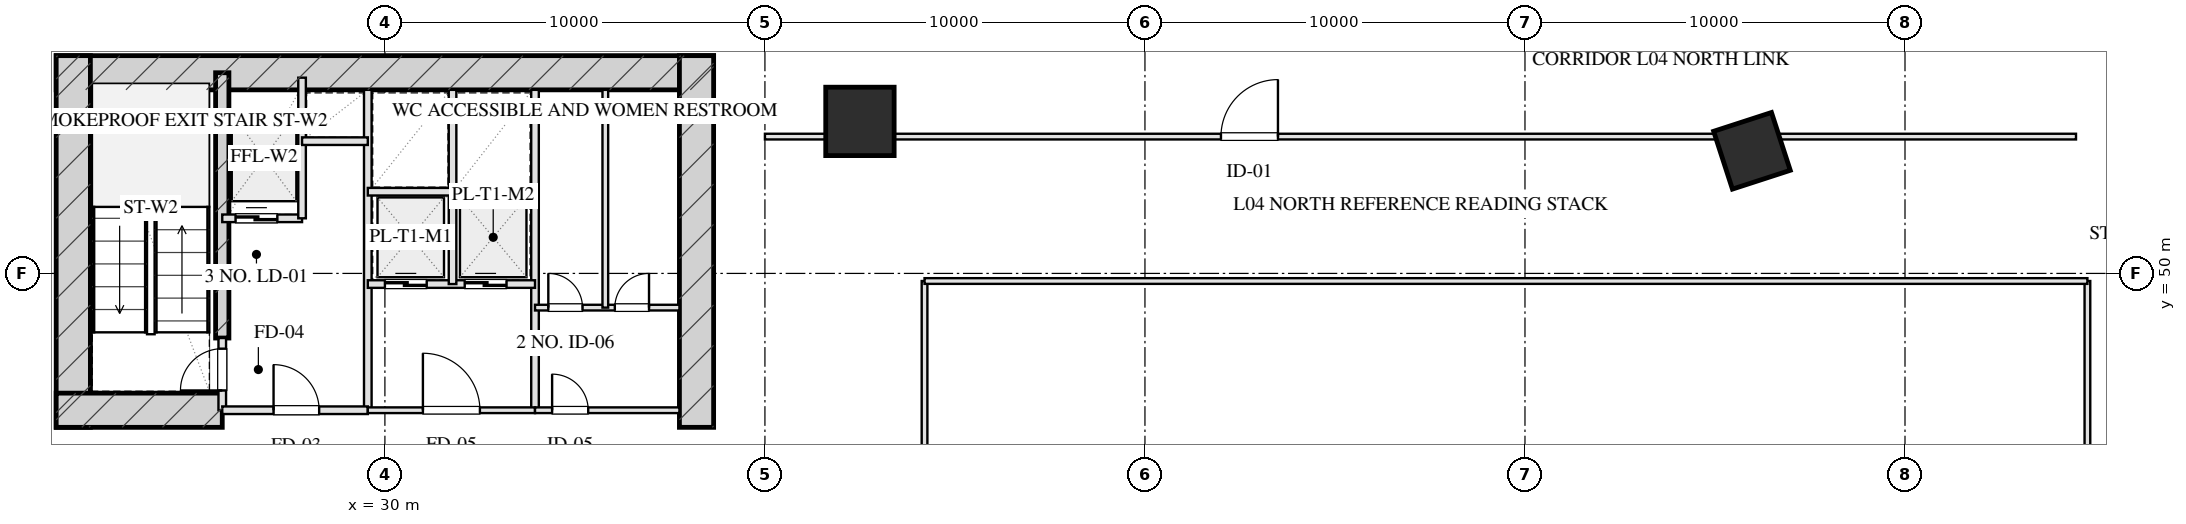
"""IFC4 building model, lengths in metres.
Left out: names, types, materials, properties, quantities, classifications, styles, units other than length and angle.
Written with IfcOpenShell. Run it as: python <this file> out.ifc"""

import sys

from ifc_helpers import new_model, si_unit, direction, frame, frame_2d, origin, origin_2d, place, context, subcontext, project, spatial, rectangle, hollow_rectangle, extrude, element, fill, save


model = new_model("IFC4")
c1 = context("Model", 3, precision=1e-05, world=origin(), true_north=direction((0.0, 1.0)))
c2 = subcontext(c1, "Body", "Model", "MODEL_VIEW")
j1 = project(units=[si_unit("LENGTHUNIT", "METRE"), si_unit("PLANEANGLEUNIT", "RADIAN")], contexts=[c1])
p1 = place(None, origin())
s1 = spatial("IfcSite", under=j1, at=p1, CompositionType="ELEMENT")
p2 = place(p1, origin())
s2 = spatial("IfcBuilding", under=s1, at=p2, CompositionType="ELEMENT")
p3 = place(p2, frame((0.0, 0.0, 22.0)))
s3 = spatial("IfcBuildingStorey", under=s2, at=p3, CompositionType="ELEMENT", Elevation=22.0)
p4 = place(p3, frame((21.35, 55.28, 0.0), z_axis=(0.0, 0.0, 1.0), x_axis=(1.0, 0.0, 0.0)))
e1 = element("IfcWall", 1, at=p4, inside=s3, PredefinedType="SHEAR", context=c2, shape_type="SweptSolid", body=[
    extrude(rectangle(XDim=17.3, YDim=0.9, at=frame_2d((8.65, 0.0))), origin(), (0.0, 0.0, 1.0), 4.0),
])
for number, where, z_axis, x_axis in (
    (2, (21.8, 45.95, 0.0), (0.0, 0.0, 1.0), (0.0, 1.0, 0.0)),
    (3, (38.2, 45.95, 0.0), (0.0, 0.0, 1.0), (0.0, 1.0, 0.0)),
):
    element("IfcWall", number, at=place(p3, frame(where, z_axis=z_axis, x_axis=x_axis)), inside=s3, PredefinedType="SHEAR", context=c2, shape_type="SweptSolid", body=[
        extrude(rectangle(XDim=9.78, YDim=0.9, at=frame_2d((4.89, 0.0))), origin(), (0.0, 0.0, 1.0), 4.0),
    ])
p5 = place(p3, frame((25.72, 48.3, 0.0), z_axis=(0.0, 0.0, 1.0), x_axis=(0.0, 1.0, 0.0)))
e4 = element("IfcWall", 4, at=p5, inside=s3, PredefinedType="SHEAR", context=c2, shape_type="SweptSolid", body=[
    extrude(rectangle(XDim=6.98, YDim=0.35, at=frame_2d((3.49, 0.0))), origin(), (0.0, 0.0, 1.0), 4.0),
])
p6 = place(p3, frame((21.35, 46.4, 0.0), z_axis=(0.0, 0.0, 1.0), x_axis=(1.0, 0.0, 0.0)))
e5 = element("IfcWall", 5, at=p6, inside=s3, PredefinedType="SHEAR", context=c2, shape_type="SweptSolid", body=[
    extrude(rectangle(XDim=4.37, YDim=0.9, at=frame_2d((2.185, 0.0))), origin(), (0.0, 0.0, 1.0), 4.0),
])
p7 = place(p3, frame((42.5, 54.0, 0.0), z_axis=(0.0, 0.0, 1.0), x_axis=(1.0, 0.0, 0.0)))
e6 = element("IfcColumn", 6, at=p7, inside=s3, PredefinedType="COLUMN", context=c2, shape_type="SweptSolid", body=[
    extrude(hollow_rectangle(XDim=1.8, YDim=1.8, WallThickness=0.06, at=origin_2d()), origin(), (0.0, 0.0, 1.0), 4.001),
])
p8 = place(p3, frame((65.973, 53.226, 0.0), z_axis=(0.0, 0.0, 1.0), x_axis=(0.951056516295, 0.309016994375, 0.0)))
e7 = element("IfcColumn", 7, at=p8, inside=s3, PredefinedType="COLUMN", context=c2, shape_type="SweptSolid", body=[
    extrude(hollow_rectangle(XDim=1.6, YDim=1.6, WallThickness=0.055, at=origin_2d()), origin(), (0.0, 0.0, 1.0), 4.001),
])
p9 = place(p3, frame((25.72, 46.4, 0.0), z_axis=(0.0, 0.0, 1.0), x_axis=(0.0, 1.0, 0.0)))
e8 = element("IfcWall", 8, at=p9, inside=s3, PredefinedType="PARTITIONING", context=c2, shape_type="SweptSolid", body=[
    extrude(rectangle(XDim=1.9, YDim=0.2, at=frame_2d((0.95, 0.0))), origin(), (0.0, 0.0, 1.0), 3.725),
])
p10 = place(p9, frame((0.52, 0.0, 0.0)))
e9 = element("IfcOpeningElement", 9, at=p10, cuts=e8, PredefinedType="OPENING", context=c2, shape_type="SweptSolid", body=[
    extrude(rectangle(XDim=1.1, YDim=2.05, at=frame_2d((0.55, 1.025))), frame((0.0, 0.11, 0.0), z_axis=(0.0, -1.0, 0.0), x_axis=(1.0, 0.0, 0.0)), (0.0, 0.0, 1.0), 0.22),
])
p11 = place(p3, frame((29.55, 46.4, 0.0), z_axis=(0.0, 0.0, 1.0), x_axis=(0.0, 1.0, 0.0)))
e10 = element("IfcWall", 10, at=p11, inside=s3, PredefinedType="PARTITIONING", context=c2, shape_type="SweptSolid", body=[
    extrude(rectangle(XDim=8.43, YDim=0.2, at=frame_2d((4.215, 0.0))), origin(), (0.0, 0.0, 1.0), 3.725),
])
p12 = place(p3, frame((25.72, 46.4, 0.0), z_axis=(0.0, 0.0, 1.0), x_axis=(1.0, 0.0, 0.0)))
e11 = element("IfcWall", 11, at=p12, inside=s3, PredefinedType="PARTITIONING", context=c2, shape_type="SweptSolid", body=[
    extrude(rectangle(XDim=3.83, YDim=0.2, at=frame_2d((1.915, 0.0))), origin(), (0.0, 0.0, 1.0), 3.725),
])
p13 = place(p12, frame((1.35, 0.0, 0.0)))
e12 = element("IfcOpeningElement", 12, at=p13, cuts=e11, PredefinedType="OPENING", context=c2, shape_type="SweptSolid", body=[
    extrude(rectangle(XDim=1.2, YDim=2.05, at=frame_2d((0.6, 1.025))), frame((0.0, 0.11, 0.0), z_axis=(0.0, -1.0, 0.0), x_axis=(1.0, 0.0, 0.0)), (0.0, 0.0, 1.0), 0.22),
])
p14 = place(p3, frame((25.72, 51.45, 0.0), z_axis=(0.0, 0.0, 1.0), x_axis=(1.0, 0.0, 0.0)))
e13 = element("IfcWall", 13, at=p14, inside=s3, PredefinedType="PARTITIONING", context=c2, shape_type="SweptSolid", body=[
    extrude(rectangle(XDim=2.1, YDim=0.2, at=frame_2d((1.05, 0.0))), origin(), (0.0, 0.0, 1.0), 3.725),
])
p15 = place(p14, frame((0.35, 0.0, 0.0)))
e14 = element("IfcOpeningElement", 14, at=p15, cuts=e13, PredefinedType="OPENING", context=c2, shape_type="SweptSolid", body=[
    extrude(rectangle(XDim=1.1, YDim=2.05, at=frame_2d((0.55, 1.025))), frame((0.0, 0.11, 0.0), z_axis=(0.0, -1.0, 0.0), x_axis=(1.0, 0.0, 0.0)), (0.0, 0.0, 1.0), 0.22),
])
p16 = place(p3, frame((27.82, 51.45, 0.0), z_axis=(0.0, 0.0, 1.0), x_axis=(0.0, 1.0, 0.0)))
e15 = element("IfcWall", 15, at=p16, inside=s3, PredefinedType="PARTITIONING", context=c2, shape_type="SweptSolid", body=[
    extrude(rectangle(XDim=3.7, YDim=0.2, at=frame_2d((1.85, 0.0))), origin(), (0.0, 0.0, 1.0), 3.725),
])
p17 = place(p3, frame((27.82, 53.48, 0.0), z_axis=(0.0, 0.0, 1.0), x_axis=(1.0, 0.0, 0.0)))
e16 = element("IfcWall", 16, at=p17, inside=s3, PredefinedType="PARTITIONING", context=c2, shape_type="SweptSolid", body=[
    extrude(rectangle(XDim=1.73, YDim=0.2, at=frame_2d((0.865, 0.0))), origin(), (0.0, 0.0, 1.0), 3.725),
])
p18 = place(p3, frame((33.95, 46.4, 0.0), z_axis=(0.0, 0.0, 1.0), x_axis=(0.0, 1.0, 0.0)))
e17 = element("IfcWall", 17, at=p18, inside=s3, PredefinedType="PARTITIONING", context=c2, shape_type="SweptSolid", body=[
    extrude(rectangle(XDim=8.43, YDim=0.2, at=frame_2d((4.215, 0.0))), origin(), (0.0, 0.0, 1.0), 3.725),
])
p19 = place(p3, frame((29.55, 46.4, 0.0), z_axis=(0.0, 0.0, 1.0), x_axis=(1.0, 0.0, 0.0)))
e18 = element("IfcWall", 18, at=p19, inside=s3, PredefinedType="PARTITIONING", context=c2, shape_type="SweptSolid", body=[
    extrude(rectangle(XDim=4.4, YDim=0.15, at=frame_2d((2.2, 0.0))), origin(), (0.0, 0.0, 1.0), 3.725),
])
p20 = place(p19, frame((1.45, 0.0, 0.0)))
e19 = element("IfcOpeningElement", 19, at=p20, cuts=e18, PredefinedType="OPENING", context=c2, shape_type="SweptSolid", body=[
    extrude(rectangle(XDim=1.5, YDim=2.05, at=frame_2d((0.75, 1.025))), frame((0.0, 0.085, 0.0), z_axis=(0.0, -1.0, 0.0), x_axis=(1.0, 0.0, 0.0)), (0.0, 0.0, 1.0), 0.17),
])
p21 = place(p3, frame((29.55, 49.72, 0.0), z_axis=(0.0, 0.0, 1.0), x_axis=(1.0, 0.0, 0.0)))
e20 = element("IfcWall", 20, at=p21, inside=s3, PredefinedType="PARTITIONING", context=c2, shape_type="SweptSolid", body=[
    extrude(rectangle(XDim=4.4, YDim=0.2, at=frame_2d((2.2, 0.0))), origin(), (0.0, 0.0, 1.0), 3.725),
])
p22 = place(p21, frame((0.45, 0.0, 0.0)))
e21 = element("IfcOpeningElement", 21, at=p22, cuts=e20, PredefinedType="OPENING", context=c2, shape_type="SweptSolid", body=[
    extrude(rectangle(XDim=1.1, YDim=2.05, at=frame_2d((0.55, 1.025))), frame((0.0, 0.11, 0.0), z_axis=(0.0, -1.0, 0.0), x_axis=(1.0, 0.0, 0.0)), (0.0, 0.0, 1.0), 0.22),
])
p23 = place(p21, frame((2.55, 0.0, 0.0)))
e22 = element("IfcOpeningElement", 22, at=p23, cuts=e20, PredefinedType="OPENING", context=c2, shape_type="SweptSolid", body=[
    extrude(rectangle(XDim=1.1, YDim=2.05, at=frame_2d((0.55, 1.025))), frame((0.0, 0.11, 0.0), z_axis=(0.0, -1.0, 0.0), x_axis=(1.0, 0.0, 0.0)), (0.0, 0.0, 1.0), 0.22),
])
p24 = place(p3, frame((31.78, 49.72, 0.0), z_axis=(0.0, 0.0, 1.0), x_axis=(0.0, 1.0, 0.0)))
e23 = element("IfcWall", 23, at=p24, inside=s3, PredefinedType="PARTITIONING", context=c2, shape_type="SweptSolid", body=[
    extrude(rectangle(XDim=5.11, YDim=0.2, at=frame_2d((2.555, 0.0))), origin(), (0.0, 0.0, 1.0), 3.725),
])
p25 = place(p3, frame((29.55, 52.15, 0.0), z_axis=(0.0, 0.0, 1.0), x_axis=(1.0, 0.0, 0.0)))
e24 = element("IfcWall", 24, at=p25, inside=s3, PredefinedType="PARTITIONING", context=c2, shape_type="SweptSolid", body=[
    extrude(rectangle(XDim=4.4, YDim=0.2, at=frame_2d((2.2, 0.0))), origin(), (0.0, 0.0, 1.0), 3.725),
])
p26 = place(p3, frame((33.95, 46.4, 0.0), z_axis=(0.0, 0.0, 1.0), x_axis=(1.0, 0.0, 0.0)))
e25 = element("IfcWall", 25, at=p26, inside=s3, PredefinedType="PARTITIONING", context=c2, shape_type="SweptSolid", body=[
    extrude(rectangle(XDim=3.8, YDim=0.15, at=frame_2d((1.9, 0.0))), origin(), (0.0, 0.0, 1.0), 3.725),
])
p27 = place(p26, frame((0.45, 0.0, 0.0)))
e26 = element("IfcOpeningElement", 26, at=p27, cuts=e25, PredefinedType="OPENING", context=c2, shape_type="SweptSolid", body=[
    extrude(rectangle(XDim=0.95, YDim=2.05, at=frame_2d((0.475, 1.025))), frame((0.0, 0.085, 0.0), z_axis=(0.0, -1.0, 0.0), x_axis=(1.0, 0.0, 0.0)), (0.0, 0.0, 1.0), 0.17),
])
p28 = place(p3, frame((33.95, 49.1, 0.0), z_axis=(0.0, 0.0, 1.0), x_axis=(1.0, 0.0, 0.0)))
e27 = element("IfcWall", 27, at=p28, inside=s3, PredefinedType="PARTITIONING", context=c2, shape_type="SweptSolid", body=[
    extrude(rectangle(XDim=3.8, YDim=0.15, at=frame_2d((1.9, 0.0))), origin(), (0.0, 0.0, 1.0), 3.725),
])
p29 = place(p28, frame((0.35, 0.0, 0.0)))
e28 = element("IfcOpeningElement", 28, at=p29, cuts=e27, PredefinedType="OPENING", context=c2, shape_type="SweptSolid", body=[
    extrude(rectangle(XDim=0.9, YDim=2.05, at=frame_2d((0.45, 1.025))), frame((0.0, 0.085, 0.0), z_axis=(0.0, -1.0, 0.0), x_axis=(1.0, 0.0, 0.0)), (0.0, 0.0, 1.0), 0.17),
])
p30 = place(p28, frame((2.1, 0.0, 0.0)))
e29 = element("IfcOpeningElement", 29, at=p30, cuts=e27, PredefinedType="OPENING", context=c2, shape_type="SweptSolid", body=[
    extrude(rectangle(XDim=0.9, YDim=2.05, at=frame_2d((0.45, 1.025))), frame((0.0, 0.085, 0.0), z_axis=(0.0, -1.0, 0.0), x_axis=(1.0, 0.0, 0.0)), (0.0, 0.0, 1.0), 0.17),
])
p31 = place(p3, frame((35.8, 49.1, 0.0), z_axis=(0.0, 0.0, 1.0), x_axis=(0.0, 1.0, 0.0)))
e30 = element("IfcWall", 30, at=p31, inside=s3, PredefinedType="PARTITIONING", context=c2, shape_type="SweptSolid", body=[
    extrude(rectangle(XDim=5.73, YDim=0.15, at=frame_2d((2.865, 0.0))), origin(), (0.0, 0.0, 1.0), 3.725),
])
p32 = place(p3, frame((44.2, 18.2, 0.0), z_axis=(0.0, 0.0, 1.0), x_axis=(0.0, 1.0, 0.0)))
e31 = element("IfcWall", 31, at=p32, inside=s3, PredefinedType="PARTITIONING", context=c2, shape_type="SweptSolid", body=[
    extrude(rectangle(XDim=31.6, YDim=0.15, at=frame_2d((15.8, 0.0))), origin(), (0.0, 0.0, 1.0), 3.725),
])
p33 = place(p32, frame((14.0, 0.0, 0.0)))
e32 = element("IfcOpeningElement", 32, at=p33, cuts=e31, PredefinedType="OPENING", context=c2, shape_type="SweptSolid", body=[
    extrude(rectangle(XDim=1.5, YDim=2.05, at=frame_2d((0.75, 1.025))), frame((0.0, 0.085, 0.0), z_axis=(0.0, -1.0, 0.0), x_axis=(1.0, 0.0, 0.0)), (0.0, 0.0, 1.0), 0.17),
])
p34 = place(p3, frame((74.8, 18.2, 0.0), z_axis=(0.0, 0.0, 1.0), x_axis=(0.0, 1.0, 0.0)))
e33 = element("IfcWall", 33, at=p34, inside=s3, PredefinedType="PARTITIONING", context=c2, shape_type="SweptSolid", body=[
    extrude(rectangle(XDim=31.6, YDim=0.15, at=frame_2d((15.8, 0.0))), origin(), (0.0, 0.0, 1.0), 2.315),
])
p35 = place(p34, frame((14.0, 0.0, 0.0)))
e34 = element("IfcOpeningElement", 34, at=p35, cuts=e33, PredefinedType="OPENING", context=c2, shape_type="SweptSolid", body=[
    extrude(rectangle(XDim=1.5, YDim=2.05, at=frame_2d((0.75, 1.025))), frame((0.0, 0.085, 0.0), z_axis=(0.0, -1.0, 0.0), x_axis=(1.0, 0.0, 0.0)), (0.0, 0.0, 1.0), 0.17),
])
p36 = place(p3, frame((44.2, 49.8, 0.0), z_axis=(0.0, 0.0, 1.0), x_axis=(1.0, 0.0, 0.0)))
e35 = element("IfcWall", 35, at=p36, inside=s3, PredefinedType="PARTITIONING", context=c2, shape_type="SweptSolid", body=[
    extrude(rectangle(XDim=30.6, YDim=0.15, at=frame_2d((15.3, 0.0))), origin(), (0.0, 0.0, 1.0), 3.265),
])
p37 = place(p3, frame((40.0, 53.6, 0.0), z_axis=(0.0, 0.0, 1.0), x_axis=(1.0, 0.0, 0.0)))
e36 = element("IfcWall", 36, at=p37, inside=s3, PredefinedType="PARTITIONING", context=c2, shape_type="SweptSolid", body=[
    extrude(rectangle(XDim=34.5, YDim=0.15, at=frame_2d((17.25, 0.0))), origin(), (0.0, 0.0, 1.0), 2.315),
])
p38 = place(p37, frame((12.0, 0.0, 0.0)))
e37 = element("IfcOpeningElement", 37, at=p38, cuts=e36, PredefinedType="OPENING", context=c2, shape_type="SweptSolid", body=[
    extrude(rectangle(XDim=1.5, YDim=2.05, at=frame_2d((0.75, 1.025))), frame((0.0, 0.085, 0.0), z_axis=(0.0, -1.0, 0.0), x_axis=(1.0, 0.0, 0.0)), (0.0, 0.0, 1.0), 0.17),
])
p39 = place(p10, origin())
e38 = element("IfcDoor", 38, at=p39, inside=s3, OperationType="SINGLE_SWING_LEFT", PredefinedType="DOOR", context=c2, shape_type="SweptSolid", body=[
    extrude(rectangle(XDim=1.1, YDim=2.05, at=frame_2d((0.55, 1.025))), frame((0.0, 0.025, 0.0), z_axis=(0.0, -1.0, 0.0), x_axis=(1.0, 0.0, 0.0)), (0.0, 0.0, 1.0), 0.05),
])
fill(e9, e38)
p40 = place(p13, origin())
e39 = element("IfcDoor", 39, at=p40, inside=s3, OperationType="SINGLE_SWING_LEFT", PredefinedType="DOOR", context=c2, shape_type="SweptSolid", body=[
    extrude(rectangle(XDim=1.2, YDim=2.05, at=frame_2d((0.6, 1.025))), frame((0.0, 0.025, 0.0), z_axis=(0.0, -1.0, 0.0), x_axis=(1.0, 0.0, 0.0)), (0.0, 0.0, 1.0), 0.05),
])
fill(e12, e39)
p41 = place(p15, origin())
e40 = element("IfcDoor", 40, at=p41, inside=s3, OperationType="DOUBLE_DOOR_SLIDING", PredefinedType="DOOR", context=c2, shape_type="SweptSolid", body=[
    extrude(rectangle(XDim=1.1, YDim=2.05, at=frame_2d((0.55, 1.025))), frame((0.0, 0.025, 0.0), z_axis=(0.0, -1.0, 0.0), x_axis=(1.0, 0.0, 0.0)), (0.0, 0.0, 1.0), 0.05),
])
fill(e14, e40)
p42 = place(p20, origin())
e41 = element("IfcDoor", 41, at=p42, inside=s3, OperationType="SINGLE_SWING_LEFT", PredefinedType="DOOR", context=c2, shape_type="SweptSolid", body=[
    extrude(rectangle(XDim=1.5, YDim=2.05, at=frame_2d((0.75, 1.025))), frame((0.0, 0.025, 0.0), z_axis=(0.0, -1.0, 0.0), x_axis=(1.0, 0.0, 0.0)), (0.0, 0.0, 1.0), 0.05),
])
fill(e19, e41)
p43 = place(p22, origin())
e42 = element("IfcDoor", 42, at=p43, inside=s3, OperationType="DOUBLE_DOOR_SLIDING", PredefinedType="DOOR", context=c2, shape_type="SweptSolid", body=[
    extrude(rectangle(XDim=1.1, YDim=2.05, at=frame_2d((0.55, 1.025))), frame((0.0, 0.025, 0.0), z_axis=(0.0, -1.0, 0.0), x_axis=(1.0, 0.0, 0.0)), (0.0, 0.0, 1.0), 0.05),
])
fill(e21, e42)
p44 = place(p23, origin())
e43 = element("IfcDoor", 43, at=p44, inside=s3, OperationType="DOUBLE_DOOR_SLIDING", PredefinedType="DOOR", context=c2, shape_type="SweptSolid", body=[
    extrude(rectangle(XDim=1.1, YDim=2.05, at=frame_2d((0.55, 1.025))), frame((0.0, 0.025, 0.0), z_axis=(0.0, -1.0, 0.0), x_axis=(1.0, 0.0, 0.0)), (0.0, 0.0, 1.0), 0.05),
])
fill(e22, e43)
p45 = place(p27, origin())
e44 = element("IfcDoor", 44, at=p45, inside=s3, OperationType="SINGLE_SWING_LEFT", PredefinedType="DOOR", context=c2, shape_type="SweptSolid", body=[
    extrude(rectangle(XDim=0.95, YDim=2.05, at=frame_2d((0.475, 1.025))), frame((0.0, 0.025, 0.0), z_axis=(0.0, -1.0, 0.0), x_axis=(1.0, 0.0, 0.0)), (0.0, 0.0, 1.0), 0.05),
])
fill(e26, e44)
p46 = place(p29, origin())
e45 = element("IfcDoor", 45, at=p46, inside=s3, OperationType="SINGLE_SWING_LEFT", PredefinedType="DOOR", context=c2, shape_type="SweptSolid", body=[
    extrude(rectangle(XDim=0.9, YDim=2.05, at=frame_2d((0.45, 1.025))), frame((0.0, 0.025, 0.0), z_axis=(0.0, -1.0, 0.0), x_axis=(1.0, 0.0, 0.0)), (0.0, 0.0, 1.0), 0.05),
])
fill(e28, e45)
p47 = place(p30, origin())
e46 = element("IfcDoor", 46, at=p47, inside=s3, OperationType="SINGLE_SWING_RIGHT", PredefinedType="DOOR", context=c2, shape_type="SweptSolid", body=[
    extrude(rectangle(XDim=0.9, YDim=2.05, at=frame_2d((0.45, 1.025))), frame((0.0, 0.025, 0.0), z_axis=(0.0, -1.0, 0.0), x_axis=(1.0, 0.0, 0.0)), (0.0, 0.0, 1.0), 0.05),
])
fill(e29, e46)
p48 = place(p38, origin())
e47 = element("IfcDoor", 47, at=p48, inside=s3, OperationType="SINGLE_SWING_RIGHT", PredefinedType="DOOR", context=c2, shape_type="SweptSolid", body=[
    extrude(rectangle(XDim=1.5, YDim=2.05, at=frame_2d((0.75, 1.025))), frame((0.0, 0.025, 0.0), z_axis=(0.0, -1.0, 0.0), x_axis=(1.0, 0.0, 0.0)), (0.0, 0.0, 1.0), 0.05),
])
fill(e37, e47)
save(model, sys.argv[1])
